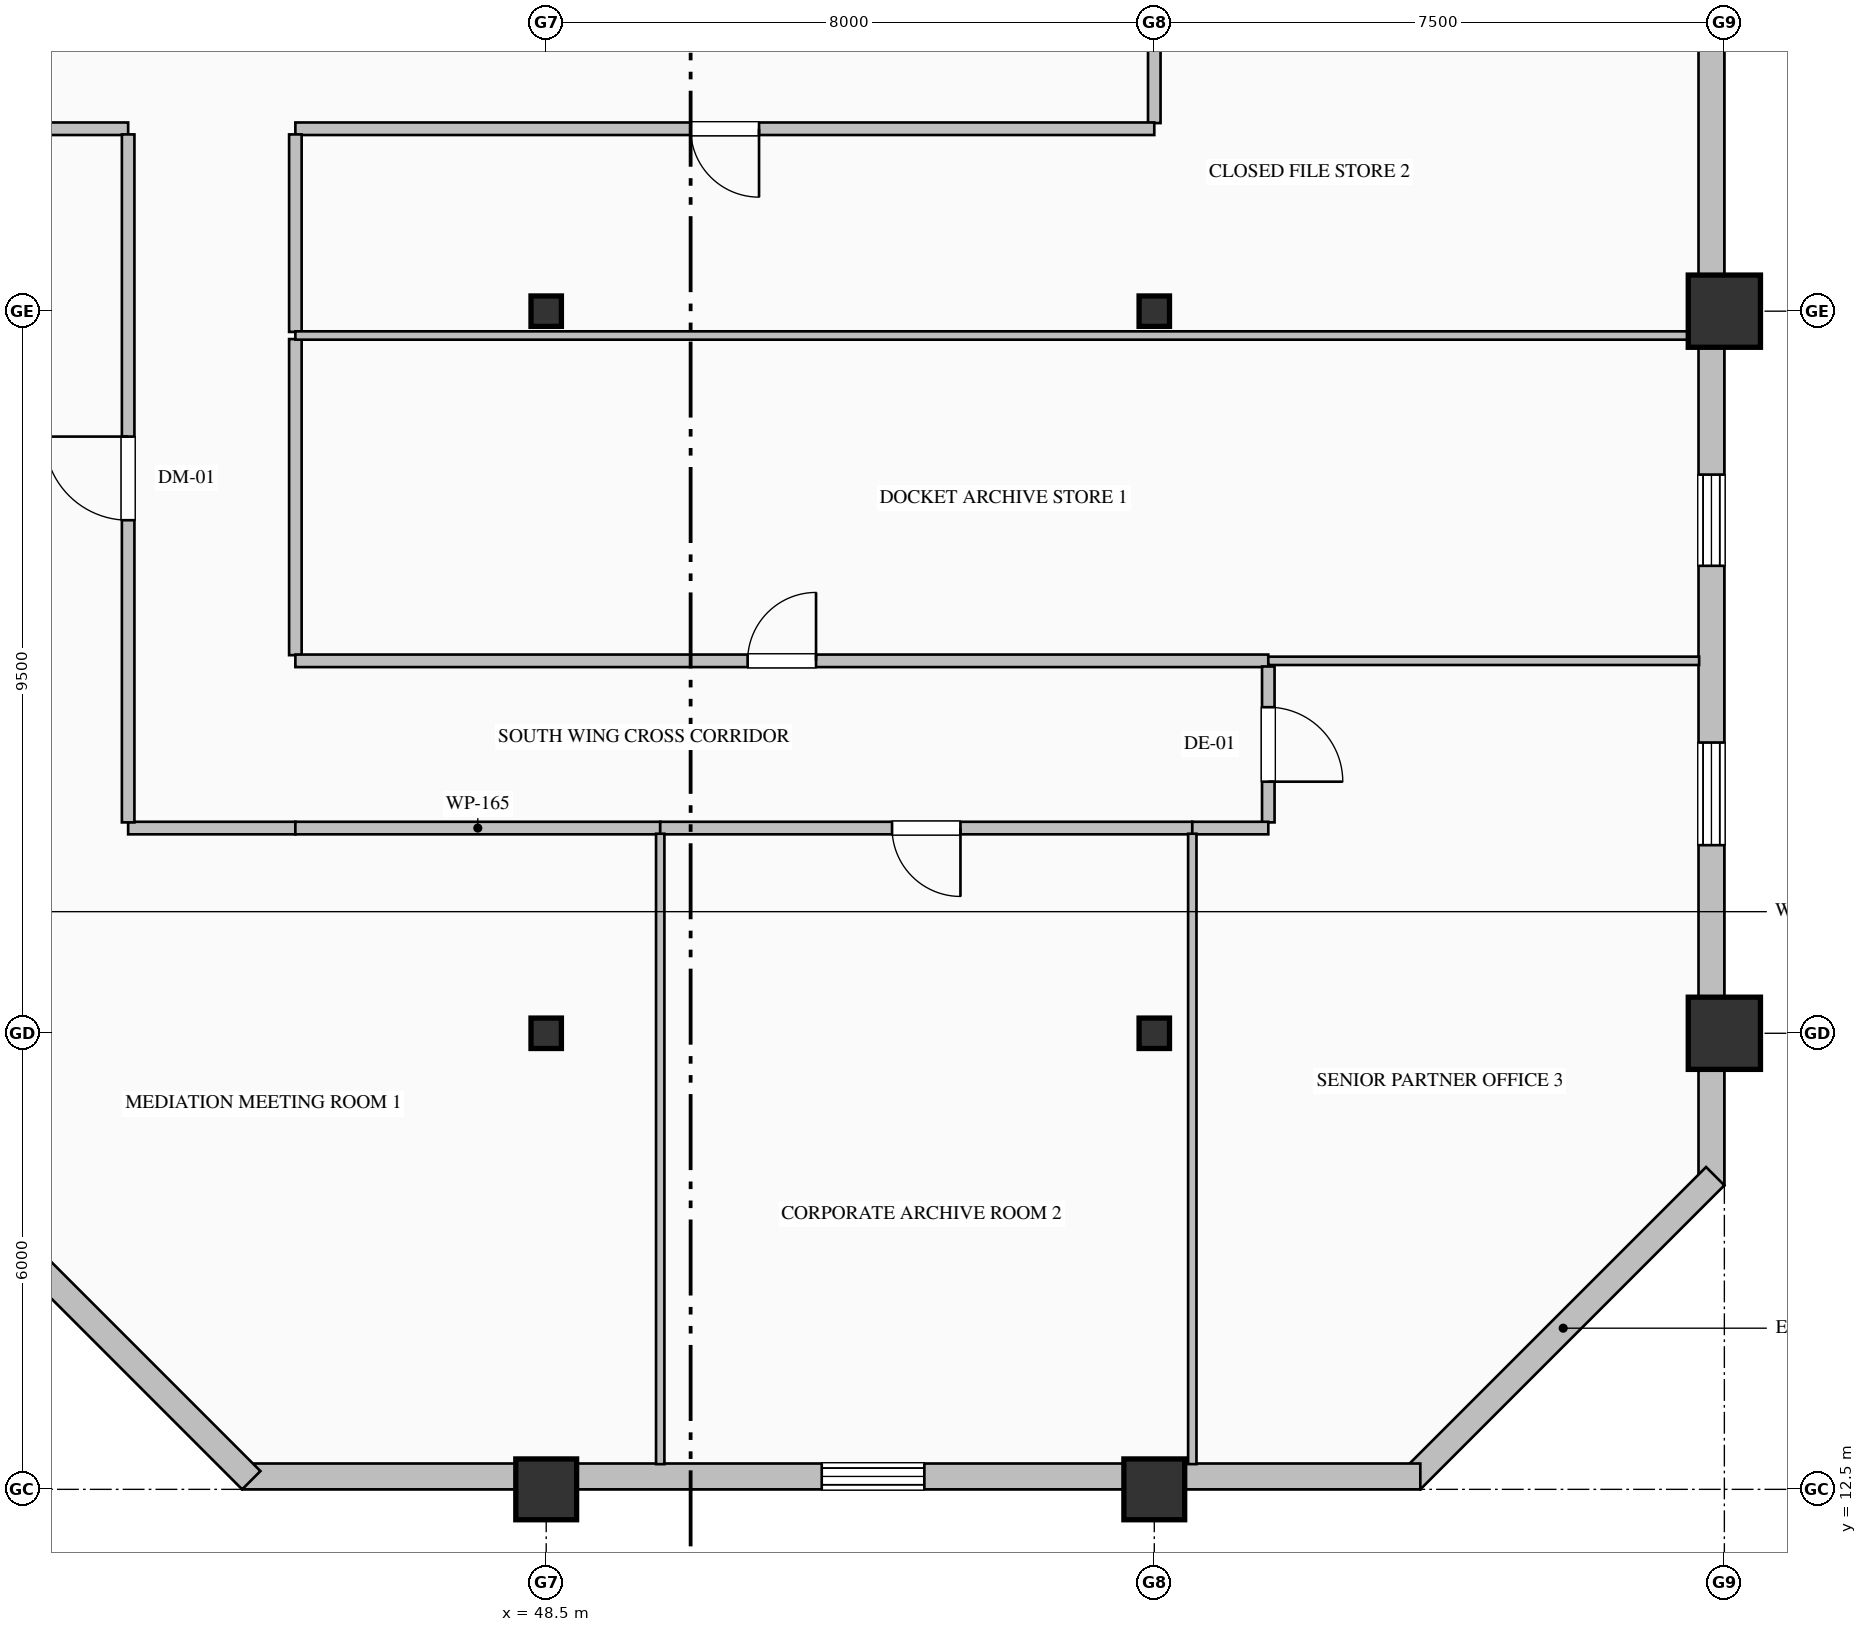
"""IFC4 building model, lengths in metres.
Left out: names, types, materials, properties, quantities, classifications, styles, units other than length and angle.
Written with IfcOpenShell. Run it as: python <this file> out.ifc"""

import sys

from ifc_helpers import new_model, si_unit, direction, frame, frame_2d, origin, origin_2d, place, context, subcontext, project, spatial, rectangle, hollow_rectangle, i_section, extrude, element, fill, save


model = new_model("IFC4")
c1 = context("Model", 3, precision=1e-05, world=origin(), true_north=direction((0.0, 1.0)))
c2 = subcontext(c1, "Body", "Model", "MODEL_VIEW")
j1 = project(units=[si_unit("LENGTHUNIT", "METRE"), si_unit("PLANEANGLEUNIT", "RADIAN")], contexts=[c1])
p1 = place(None, origin())
s1 = spatial("IfcSite", under=j1, at=p1, CompositionType="ELEMENT")
p2 = place(p1, origin())
s2 = spatial("IfcBuilding", under=s1, at=p2, CompositionType="ELEMENT")
p3 = place(p2, frame((0.0, 0.0, 277.8)))
s3 = spatial("IfcBuildingStorey", under=s2, at=p3, CompositionType="ELEMENT", Elevation=277.8)
p4 = place(p3, frame((48.5, 12.5, 0.0), z_axis=(0.0, 0.0, 1.0), x_axis=(1.0, 0.0, 0.0)))
e1 = element("IfcColumn", 1, at=p4, inside=s3, PredefinedType="COLUMN", context=c2, shape_type="SweptSolid", body=[
    extrude(hollow_rectangle(XDim=0.8, YDim=0.8, WallThickness=0.032, at=origin_2d()), origin(), (0.0, 0.0, 1.0), 4.0),
])
for number, where, z_axis, x_axis in (
    (2, (48.5, 18.5, 0.0), (0.0, 0.0, 1.0), (1.0, 0.0, 0.0)),
    (3, (48.5, 28.0, 0.0), (0.0, 0.0, 1.0), (1.0, 0.0, 0.0)),
):
    element("IfcColumn", number, at=place(p3, frame(where, z_axis=z_axis, x_axis=x_axis)), inside=s3, PredefinedType="COLUMN", context=c2, shape_type="SweptSolid", body=[
        extrude(i_section(OverallWidth=0.4, OverallDepth=0.4, WebThickness=0.013, FlangeThickness=0.021, FilletRadius=0.022, at=origin_2d()), origin(), (0.0, 0.0, 1.0), 4.0),
    ])
p5 = place(p3, frame((56.5, 12.5, 0.0), z_axis=(0.0, 0.0, 1.0), x_axis=(1.0, 0.0, 0.0)))
e4 = element("IfcColumn", 4, at=p5, inside=s3, PredefinedType="COLUMN", context=c2, shape_type="SweptSolid", body=[
    extrude(hollow_rectangle(XDim=0.8, YDim=0.8, WallThickness=0.032, at=origin_2d()), origin(), (0.0, 0.0, 1.0), 4.0),
])
for number, where, z_axis, x_axis in (
    (5, (56.5, 18.5, 0.0), (0.0, 0.0, 1.0), (1.0, 0.0, 0.0)),
    (6, (56.5, 28.0, 0.0), (0.0, 0.0, 1.0), (1.0, 0.0, 0.0)),
):
    element("IfcColumn", number, at=place(p3, frame(where, z_axis=z_axis, x_axis=x_axis)), inside=s3, PredefinedType="COLUMN", context=c2, shape_type="SweptSolid", body=[
        extrude(i_section(OverallWidth=0.4, OverallDepth=0.4, WebThickness=0.013, FlangeThickness=0.021, FilletRadius=0.022, at=origin_2d()), origin(), (0.0, 0.0, 1.0), 4.0),
    ])
for number, where, z_axis, x_axis in (
    (7, (64.0, 18.5, 0.0), (0.0, 0.0, 1.0), (1.0, 0.0, 0.0)),
    (8, (64.0, 28.0, 0.0), (0.0, 0.0, 1.0), (1.0, 0.0, 0.0)),
):
    element("IfcColumn", number, at=place(p3, frame(where, z_axis=z_axis, x_axis=x_axis)), inside=s3, PredefinedType="COLUMN", context=c2, shape_type="SweptSolid", body=[
        extrude(hollow_rectangle(XDim=0.95, YDim=0.95, WallThickness=0.036, at=origin_2d()), origin(), (0.0, 0.0, 1.0), 4.0),
    ])
p6 = place(p3, frame((63.83, 36.05, 0.0), z_axis=(0.0, 0.0, 1.0), x_axis=(0.0, -1.0, 0.0)))
e9 = element("IfcWall", 9, at=p6, inside=s3, PredefinedType="SOLIDWALL", context=c2, shape_type="SweptSolid", body=[
    extrude(rectangle(XDim=19.55, YDim=0.34, at=frame_2d((9.775, 0.0))), origin(), (0.0, 0.0, 1.0), 3.2),
])
p7 = place(p6, frame((10.2, 0.0, 0.9)))
e10 = element("IfcOpeningElement", 10, at=p7, cuts=e9, PredefinedType="OPENING", context=c2, shape_type="SweptSolid", body=[
    extrude(rectangle(XDim=1.2, YDim=1.85, at=frame_2d((0.6, 0.925))), frame((0.0, 0.18, 0.0), z_axis=(0.0, -1.0, 0.0), x_axis=(1.0, 0.0, 0.0)), (0.0, 0.0, 1.0), 0.36),
])
p8 = place(p6, frame((13.725, 0.0, 0.9)))
e11 = element("IfcOpeningElement", 11, at=p8, cuts=e9, PredefinedType="OPENING", context=c2, shape_type="SweptSolid", body=[
    extrude(rectangle(XDim=1.35, YDim=1.85, at=frame_2d((0.675, 0.925))), frame((0.0, 0.18, 0.0), z_axis=(0.0, -1.0, 0.0), x_axis=(1.0, 0.0, 0.0)), (0.0, 0.0, 1.0), 0.36),
])
p9 = place(p3, frame((63.88, 16.62, 0.0), z_axis=(0.0, 0.0, 1.0), x_axis=(-0.707106781187, -0.707106781187, 0.0)))
e12 = element("IfcWall", 12, at=p9, inside=s3, PredefinedType="SOLIDWALL", context=c2, shape_type="SweptSolid", body=[
    extrude(rectangle(XDim=5.657, YDim=0.34, at=frame_2d((2.828, 0.0))), origin(), (0.0, 0.0, 1.0), 3.65),
])
p10 = place(p3, frame((60.0, 12.67, 0.0), z_axis=(0.0, 0.0, 1.0), x_axis=(-1.0, 0.0, 0.0)))
e13 = element("IfcWall", 13, at=p10, inside=s3, PredefinedType="SOLIDWALL", context=c2, shape_type="SweptSolid", body=[
    extrude(rectangle(XDim=15.5, YDim=0.34, at=frame_2d((7.75, 0.0))), origin(), (0.0, 0.0, 1.0), 3.2),
])
p11 = place(p10, frame((6.525, 0.0, 0.9)))
e14 = element("IfcOpeningElement", 14, at=p11, cuts=e13, PredefinedType="OPENING", context=c2, shape_type="SweptSolid", body=[
    extrude(rectangle(XDim=1.35, YDim=1.85, at=frame_2d((0.675, 0.925))), frame((0.0, 0.18, 0.0), z_axis=(0.0, -1.0, 0.0), x_axis=(1.0, 0.0, 0.0)), (0.0, 0.0, 1.0), 0.36),
])
p12 = place(p3, frame((44.62, 12.62, 0.0), z_axis=(0.0, 0.0, 1.0), x_axis=(-0.707106781187, 0.707106781187, 0.0)))
e15 = element("IfcWall", 15, at=p12, inside=s3, PredefinedType="SOLIDWALL", context=c2, shape_type="SweptSolid", body=[
    extrude(rectangle(XDim=5.657, YDim=0.34, at=frame_2d((2.828, 0.0))), origin(), (0.0, 0.0, 1.0), 3.65),
])
p13 = place(p3, frame((56.5, 31.793, 0.0), z_axis=(0.0, 0.0, 1.0), x_axis=(0.0, -1.0, 0.0)))
e16 = element("IfcWall", 16, at=p13, inside=s3, PredefinedType="PARTITIONING", context=c2, shape_type="SweptSolid", body=[
    extrude(rectangle(XDim=1.318, YDim=0.165, at=frame_2d((0.659, 0.0))), origin(), (0.0, 0.0, 1.0), 3.054),
])
p14 = place(p3, frame((56.5, 30.4, 0.0), z_axis=(0.0, 0.0, 1.0), x_axis=(-1.0, 0.0, 0.0)))
e17 = element("IfcWall", 17, at=p14, inside=s3, PredefinedType="PARTITIONING", context=c2, shape_type="SweptSolid", body=[
    extrude(rectangle(XDim=11.3, YDim=0.165, at=frame_2d((5.65, 0.0))), origin(), (0.0, 0.0, 1.0), 3.65),
])
p15 = place(p14, frame((5.2, 0.0, 0.0)))
e18 = element("IfcOpeningElement", 18, at=p15, cuts=e17, PredefinedType="OPENING", context=c2, shape_type="SweptSolid", body=[
    extrude(rectangle(XDim=0.9, YDim=2.15, at=frame_2d((0.45, 1.075))), frame((0.0, 0.093, 0.0), z_axis=(0.0, -1.0, 0.0), x_axis=(1.0, 0.0, 0.0)), (0.0, 0.0, 1.0), 0.185),
])
p16 = place(p3, frame((43.0, 30.4, 0.0), z_axis=(0.0, 0.0, 1.0), x_axis=(-1.0, 0.0, 0.0)))
e19 = element("IfcWall", 19, at=p16, inside=s3, PredefinedType="PARTITIONING", context=c2, shape_type="SweptSolid", body=[
    extrude(rectangle(XDim=2.5, YDim=0.165, at=frame_2d((1.25, 0.0))), origin(), (0.0, 0.0, 1.0), 3.65),
])
p17 = place(p3, frame((45.2, 27.633, 0.0), z_axis=(0.0, 0.0, 1.0), x_axis=(0.0, -1.0, 0.0)))
e20 = element("IfcWall", 20, at=p17, inside=s3, PredefinedType="PARTITIONING", context=c2, shape_type="SweptSolid", body=[
    extrude(rectangle(XDim=4.158, YDim=0.165, at=frame_2d((2.079, 0.0))), origin(), (0.0, 0.0, 1.0), 3.65),
])
p18 = place(p3, frame((45.2, 30.325, 0.0), z_axis=(0.0, 0.0, 1.0), x_axis=(0.0, -1.0, 0.0)))
e21 = element("IfcWall", 21, at=p18, inside=s3, PredefinedType="PARTITIONING", context=c2, shape_type="SweptSolid", body=[
    extrude(rectangle(XDim=2.598, YDim=0.165, at=frame_2d((1.299, 0.0))), origin(), (0.0, 0.0, 1.0), 3.65),
])
p19 = place(p3, frame((45.2, 21.2, 0.0), z_axis=(0.0, 0.0, 1.0), x_axis=(-1.0, 0.0, 0.0)))
e22 = element("IfcWall", 22, at=p19, inside=s3, PredefinedType="PARTITIONING", context=c2, shape_type="SweptSolid", body=[
    extrude(rectangle(XDim=2.2, YDim=0.165, at=frame_2d((1.1, 0.0))), origin(), (0.0, 0.0, 1.0), 3.65),
])
p20 = place(p3, frame((43.0, 21.274, 0.0), z_axis=(0.0, 0.0, 1.0), x_axis=(0.0, 1.0, 0.0)))
e23 = element("IfcWall", 23, at=p20, inside=s3, PredefinedType="PARTITIONING", context=c2, shape_type="SweptSolid", body=[
    extrude(rectangle(XDim=9.051, YDim=0.165, at=frame_2d((4.525, 0.0))), origin(), (0.0, 0.0, 1.0), 3.65),
])
p21 = place(p20, frame((3.976, 0.0, 0.0)))
e24 = element("IfcOpeningElement", 24, at=p21, cuts=e23, PredefinedType="OPENING", context=c2, shape_type="SweptSolid", body=[
    extrude(rectangle(XDim=1.1, YDim=2.2, at=frame_2d((0.55, 1.1))), frame((0.0, 0.093, 0.0), z_axis=(0.0, -1.0, 0.0), x_axis=(1.0, 0.0, 0.0)), (0.0, 0.0, 1.0), 0.185),
])
p22 = place(p3, frame((45.2, 23.4, 0.0), z_axis=(0.0, 0.0, 1.0), x_axis=(1.0, 0.0, 0.0)))
e25 = element("IfcWall", 25, at=p22, inside=s3, PredefinedType="PARTITIONING", context=c2, shape_type="SweptSolid", body=[
    extrude(rectangle(XDim=12.8, YDim=0.165, at=frame_2d((6.4, 0.0))), origin(), (0.0, 0.0, 1.0), 3.342),
])
p23 = place(p22, frame((5.95, 0.0, 0.0)))
e26 = element("IfcOpeningElement", 26, at=p23, cuts=e25, PredefinedType="OPENING", context=c2, shape_type="SweptSolid", body=[
    extrude(rectangle(XDim=0.9, YDim=2.15, at=frame_2d((0.45, 1.075))), frame((0.0, 0.093, 0.0), z_axis=(0.0, -1.0, 0.0), x_axis=(1.0, 0.0, 0.0)), (0.0, 0.0, 1.0), 0.185),
])
p24 = place(p3, frame((50.0, 21.2, 0.0), z_axis=(0.0, 0.0, 1.0), x_axis=(-1.0, 0.0, 0.0)))
e27 = element("IfcWall", 27, at=p24, inside=s3, PredefinedType="PARTITIONING", context=c2, shape_type="SweptSolid", body=[
    extrude(rectangle(XDim=4.8, YDim=0.165, at=frame_2d((2.4, 0.0))), origin(), (0.0, 0.0, 1.0), 3.65),
])
p25 = place(p3, frame((57.0, 21.2, 0.0), z_axis=(0.0, 0.0, 1.0), x_axis=(-1.0, 0.0, 0.0)))
e28 = element("IfcWall", 28, at=p25, inside=s3, PredefinedType="PARTITIONING", context=c2, shape_type="SweptSolid", body=[
    extrude(rectangle(XDim=7.0, YDim=0.165, at=frame_2d((3.5, 0.0))), origin(), (0.0, 0.0, 1.0), 3.65),
])
p26 = place(p25, frame((3.05, 0.0, 0.0)))
e29 = element("IfcOpeningElement", 29, at=p26, cuts=e28, PredefinedType="OPENING", context=c2, shape_type="SweptSolid", body=[
    extrude(rectangle(XDim=0.9, YDim=2.15, at=frame_2d((0.45, 1.075))), frame((0.0, 0.093, 0.0), z_axis=(0.0, -1.0, 0.0), x_axis=(1.0, 0.0, 0.0)), (0.0, 0.0, 1.0), 0.185),
])
p27 = place(p3, frame((58.0, 23.325, 0.0), z_axis=(0.0, 0.0, 1.0), x_axis=(0.0, -1.0, 0.0)))
e30 = element("IfcWall", 30, at=p27, inside=s3, PredefinedType="PARTITIONING", context=c2, shape_type="SweptSolid", body=[
    extrude(rectangle(XDim=2.051, YDim=0.165, at=frame_2d((1.025, 0.0))), origin(), (0.0, 0.0, 1.0), 3.65),
])
p28 = place(p27, frame((0.535, 0.0, 0.0)))
e31 = element("IfcOpeningElement", 31, at=p28, cuts=e30, PredefinedType="OPENING", context=c2, shape_type="SweptSolid", body=[
    extrude(rectangle(XDim=0.98, YDim=2.25, at=frame_2d((0.49, 1.125))), frame((0.0, 0.093, 0.0), z_axis=(0.0, -1.0, 0.0), x_axis=(1.0, 0.0, 0.0)), (0.0, 0.0, 1.0), 0.185),
])
p29 = place(p3, frame((58.0, 21.2, 0.0), z_axis=(0.0, 0.0, 1.0), x_axis=(-1.0, 0.0, 0.0)))
e32 = element("IfcWall", 32, at=p29, inside=s3, PredefinedType="PARTITIONING", context=c2, shape_type="SweptSolid", body=[
    extrude(rectangle(XDim=1.0, YDim=0.165, at=frame_2d((0.5, 0.0))), origin(), (0.0, 0.0, 1.0), 3.65),
])
p30 = place(p3, frame((45.2, 27.68, 0.0), z_axis=(0.0, 0.0, 1.0), x_axis=(1.0, 0.0, 0.0)))
e33 = element("IfcWall", 33, at=p30, inside=s3, PredefinedType="MOVABLE", context=c2, shape_type="SweptSolid", body=[
    extrude(rectangle(XDim=18.468, YDim=0.11, at=frame_2d((9.234, 0.0))), origin(), (0.0, 0.0, 1.0), 3.65),
])
p31 = place(p3, frame((63.668, 23.4, 0.0), z_axis=(0.0, 0.0, 1.0), x_axis=(-1.0, 0.0, 0.0)))
e34 = element("IfcWall", 34, at=p31, inside=s3, PredefinedType="MOVABLE", context=c2, shape_type="SweptSolid", body=[
    extrude(rectangle(XDim=5.668, YDim=0.11, at=frame_2d((2.834, 0.0))), origin(), (0.0, 0.0, 1.0), 3.65),
])
for number, where, z_axis, x_axis in (
    (35, (50.0, 21.125, 0.0), (0.0, 0.0, 1.0), (0.0, -1.0, 0.0)),
    (36, (57.0, 21.125, 0.0), (0.0, 0.0, 1.0), (0.0, -1.0, 0.0)),
):
    element("IfcWall", number, at=place(p3, frame(where, z_axis=z_axis, x_axis=x_axis)), inside=s3, PredefinedType="MOVABLE", context=c2, shape_type="SweptSolid", body=[
        extrude(rectangle(XDim=8.293, YDim=0.11, at=frame_2d((4.147, 0.0))), origin(), (0.0, 0.0, 1.0), 3.65),
    ])
p32 = place(p7, origin())
e37 = element("IfcWindow", 37, at=p32, inside=s3, PartitioningType="DOUBLE_PANEL_VERTICAL", PredefinedType="WINDOW", context=c2, shape_type="SweptSolid", body=[
    extrude(rectangle(XDim=1.2, YDim=1.85, at=frame_2d((0.6, 0.925))), frame((0.0, 0.15, 0.0), z_axis=(0.0, -1.0, 0.0), x_axis=(1.0, 0.0, 0.0)), (0.0, 0.0, 1.0), 0.06),
])
fill(e10, e37)
p33 = place(p8, origin())
e38 = element("IfcWindow", 38, at=p33, inside=s3, PartitioningType="DOUBLE_PANEL_VERTICAL", PredefinedType="WINDOW", context=c2, shape_type="SweptSolid", body=[
    extrude(rectangle(XDim=1.35, YDim=1.85, at=frame_2d((0.675, 0.925))), frame((0.0, 0.15, 0.0), z_axis=(0.0, -1.0, 0.0), x_axis=(1.0, 0.0, 0.0)), (0.0, 0.0, 1.0), 0.06),
])
fill(e11, e38)
p34 = place(p11, origin())
e39 = element("IfcWindow", 39, at=p34, inside=s3, PartitioningType="DOUBLE_PANEL_VERTICAL", PredefinedType="WINDOW", context=c2, shape_type="SweptSolid", body=[
    extrude(rectangle(XDim=1.35, YDim=1.85, at=frame_2d((0.675, 0.925))), frame((0.0, 0.15, 0.0), z_axis=(0.0, -1.0, 0.0), x_axis=(1.0, 0.0, 0.0)), (0.0, 0.0, 1.0), 0.06),
])
fill(e14, e39)
p35 = place(p23, origin())
e40 = element("IfcDoor", 40, at=p35, inside=s3, OperationType="SINGLE_SWING_RIGHT", PredefinedType="DOOR", context=c2, shape_type="SweptSolid", body=[
    extrude(rectangle(XDim=0.9, YDim=2.15, at=frame_2d((0.45, 1.075))), frame((0.0, 0.025, 0.0), z_axis=(0.0, -1.0, 0.0), x_axis=(1.0, 0.0, 0.0)), (0.0, 0.0, 1.0), 0.05),
])
fill(e26, e40)
p36 = place(p15, origin())
e41 = element("IfcDoor", 41, at=p36, inside=s3, OperationType="SINGLE_SWING_LEFT", PredefinedType="DOOR", context=c2, shape_type="SweptSolid", body=[
    extrude(rectangle(XDim=0.9, YDim=2.15, at=frame_2d((0.45, 1.075))), frame((0.0, 0.025, 0.0), z_axis=(0.0, -1.0, 0.0), x_axis=(1.0, 0.0, 0.0)), (0.0, 0.0, 1.0), 0.05),
])
fill(e18, e41)
p37 = place(p21, origin())
e42 = element("IfcDoor", 42, at=p37, inside=s3, OperationType="SINGLE_SWING_RIGHT", PredefinedType="DOOR", context=c2, shape_type="SweptSolid", body=[
    extrude(rectangle(XDim=1.1, YDim=2.2, at=frame_2d((0.55, 1.1))), frame((0.0, 0.025, 0.0), z_axis=(0.0, -1.0, 0.0), x_axis=(1.0, 0.0, 0.0)), (0.0, 0.0, 1.0), 0.05),
])
fill(e24, e42)
p38 = place(p26, origin())
e43 = element("IfcDoor", 43, at=p38, inside=s3, OperationType="SINGLE_SWING_LEFT", PredefinedType="DOOR", context=c2, shape_type="SweptSolid", body=[
    extrude(rectangle(XDim=0.9, YDim=2.15, at=frame_2d((0.45, 1.075))), frame((0.0, 0.025, 0.0), z_axis=(0.0, -1.0, 0.0), x_axis=(1.0, 0.0, 0.0)), (0.0, 0.0, 1.0), 0.05),
])
fill(e29, e43)
p39 = place(p28, origin())
e44 = element("IfcDoor", 44, at=p39, inside=s3, OperationType="SINGLE_SWING_RIGHT", PredefinedType="DOOR", context=c2, shape_type="SweptSolid", body=[
    extrude(rectangle(XDim=0.98, YDim=2.25, at=frame_2d((0.49, 1.125))), frame((0.0, 0.025, 0.0), z_axis=(0.0, -1.0, 0.0), x_axis=(1.0, 0.0, 0.0)), (0.0, 0.0, 1.0), 0.05),
])
fill(e31, e44)
save(model, sys.argv[1])
